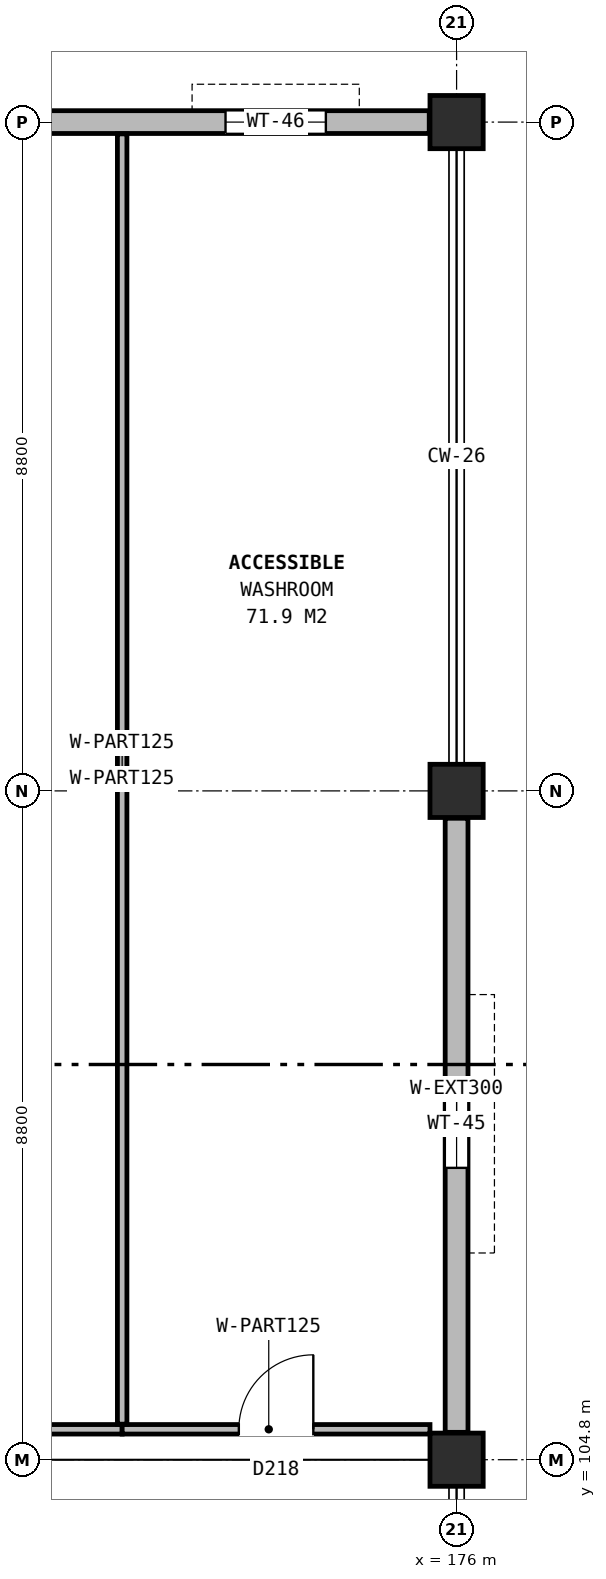
"""IFC4 building model, lengths in metres.
Left out: names, types, materials, properties, quantities, classifications, styles, units other than length and angle.
Written with IfcOpenShell. Run it as: python <this file> out.ifc"""

import sys

from ifc_helpers import new_model, si_unit, direction, frame, frame_2d, origin, origin_2d, place, context, subcontext, project, spatial, rectangle, extrude, element, fill, save


model = new_model("IFC4")
c1 = context("Model", 3, precision=1e-05, world=origin(), true_north=direction((0.0, 1.0)))
c2 = subcontext(c1, "Body", "Model", "MODEL_VIEW")
j1 = project(units=[si_unit("LENGTHUNIT", "METRE"), si_unit("PLANEANGLEUNIT", "RADIAN")], contexts=[c1])
p1 = place(None, origin())
s1 = spatial("IfcSite", under=j1, at=p1, CompositionType="ELEMENT")
p2 = place(p1, origin())
s2 = spatial("IfcBuilding", under=s1, at=p2, CompositionType="ELEMENT")
p3 = place(p2, frame((0.0, 0.0, 24.8)))
s3 = spatial("IfcBuildingStorey", under=s2, at=p3, CompositionType="ELEMENT", Elevation=24.8)
for number, where, z_axis, x_axis in (
    (1, (176.0, 104.8, 0.0), (0.0, 0.0, 1.0), (1.0, 0.0, 0.0)),
    (2, (176.0, 113.6, 0.0), (0.0, 0.0, 1.0), (1.0, 0.0, 0.0)),
    (3, (176.0, 122.4, 0.0), (0.0, 0.0, 1.0), (1.0, 0.0, 0.0)),
):
    element("IfcColumn", number, at=place(p3, frame(where, z_axis=z_axis, x_axis=x_axis)), inside=s3, PredefinedType="COLUMN", context=c2, shape_type="SweptSolid", body=[
        extrude(rectangle(XDim=0.7, YDim=0.7, at=origin_2d()), origin(), (0.0, 0.0, 1.0), 4.0),
    ])
p4 = place(p3, frame((176.0, 105.16, 0.0), z_axis=(0.0, 0.0, 1.0), x_axis=(0.0, 1.0, 0.0)))
e4 = element("IfcWall", 4, at=p4, inside=s3, PredefinedType="SOLIDWALL", context=c2, shape_type="SweptSolid", body=[
    extrude(rectangle(XDim=8.08, YDim=0.3, at=frame_2d((4.04, 0.0))), origin(), (0.0, 0.0, 1.0), 3.15),
])
p5 = place(p4, frame((3.48, 0.0, 0.9)))
e5 = element("IfcOpeningElement", 5, at=p5, cuts=e4, PredefinedType="OPENING", context=c2, shape_type="SweptSolid", body=[
    extrude(rectangle(XDim=1.16, YDim=1.74, at=frame_2d((0.58, 0.87))), frame((0.0, 0.16, 0.0), z_axis=(0.0, -1.0, 0.0), x_axis=(1.0, 0.0, 0.0)), (0.0, 0.0, 1.0), 0.32),
])
p6 = place(p3, frame((175.64, 122.4, 0.0), z_axis=(0.0, 0.0, 1.0), x_axis=(-1.0, 0.0, 0.0)))
e6 = element("IfcWall", 6, at=p6, inside=s3, PredefinedType="SOLIDWALL", context=c2, shape_type="SweptSolid", body=[
    extrude(rectangle(XDim=7.68, YDim=0.3, at=frame_2d((3.84, 0.0))), origin(), (0.0, 0.0, 1.0), 3.15),
])
p7 = place(p6, frame((1.36, 0.0, 0.9)))
e7 = element("IfcOpeningElement", 7, at=p7, cuts=e6, PredefinedType="OPENING", context=c2, shape_type="SweptSolid", body=[
    extrude(rectangle(XDim=1.32, YDim=1.78, at=frame_2d((0.66, 0.89))), frame((0.0, 0.16, 0.0), z_axis=(0.0, -1.0, 0.0), x_axis=(1.0, 0.0, 0.0)), (0.0, 0.0, 1.0), 0.32),
])
p8 = place(p3, frame((167.355, 105.2, 0.0), z_axis=(0.0, 0.0, 1.0), x_axis=(1.0, 0.0, 0.0)))
e8 = element("IfcWall", 8, at=p8, inside=s3, PredefinedType="PARTITIONING", context=c2, shape_type="SweptSolid", body=[
    extrude(rectangle(XDim=4.245, YDim=0.125, at=frame_2d((2.123, 0.0))), origin(), (0.0, 0.0, 1.0), 3.145),
])
p9 = place(p8, frame((1.633, 0.0, 0.0)))
e9 = element("IfcOpeningElement", 9, at=p9, cuts=e8, PredefinedType="OPENING", context=c2, shape_type="SweptSolid", body=[
    extrude(rectangle(XDim=0.98, YDim=2.1, at=frame_2d((0.49, 1.05))), frame((0.0, 0.073, 0.0), z_axis=(0.0, -1.0, 0.0), x_axis=(1.0, 0.0, 0.0)), (0.0, 0.0, 1.0), 0.145),
])
p10 = place(p3, frame((171.6, 105.2, 0.0), z_axis=(0.0, 0.0, 1.0), x_axis=(1.0, 0.0, 0.0)))
e10 = element("IfcWall", 10, at=p10, inside=s3, PredefinedType="PARTITIONING", context=c2, shape_type="SweptSolid", body=[
    extrude(rectangle(XDim=4.05, YDim=0.125, at=frame_2d((2.025, 0.0))), origin(), (0.0, 0.0, 1.0), 3.145),
])
p11 = place(p10, frame((1.535, 0.0, 0.0)))
e11 = element("IfcOpeningElement", 11, at=p11, cuts=e10, PredefinedType="OPENING", context=c2, shape_type="SweptSolid", body=[
    extrude(rectangle(XDim=0.98, YDim=2.1, at=frame_2d((0.49, 1.05))), frame((0.0, 0.073, 0.0), z_axis=(0.0, -1.0, 0.0), x_axis=(1.0, 0.0, 0.0)), (0.0, 0.0, 1.0), 0.145),
])
p12 = place(p3, frame((171.6, 105.268, 0.0), z_axis=(0.0, 0.0, 1.0), x_axis=(0.0, 1.0, 0.0)))
e12 = element("IfcWall", 12, at=p12, inside=s3, PredefinedType="PARTITIONING", context=c2, shape_type="SweptSolid", body=[
    extrude(rectangle(XDim=16.978, YDim=0.125, at=frame_2d((8.489, 0.0))), origin(), (0.0, 0.0, 1.0), 3.665),
])
p13 = place(p5, origin())
e13 = element("IfcWindow", 13, at=p13, inside=s3, PartitioningType="SINGLE_PANEL", PredefinedType="WINDOW", context=c2, shape_type="SweptSolid", body=[
    extrude(rectangle(XDim=1.16, YDim=1.74, at=frame_2d((0.58, 0.87))), frame((0.0, 0.03, 0.0), z_axis=(0.0, -1.0, 0.0), x_axis=(1.0, 0.0, 0.0)), (0.0, 0.0, 1.0), 0.06),
])
fill(e5, e13)
p14 = place(p7, origin())
e14 = element("IfcWindow", 14, at=p14, inside=s3, PartitioningType="SINGLE_PANEL", PredefinedType="WINDOW", context=c2, shape_type="SweptSolid", body=[
    extrude(rectangle(XDim=1.32, YDim=1.78, at=frame_2d((0.66, 0.89))), frame((0.0, 0.03, 0.0), z_axis=(0.0, -1.0, 0.0), x_axis=(1.0, 0.0, 0.0)), (0.0, 0.0, 1.0), 0.06),
])
fill(e7, e14)
p15 = place(p11, origin())
e15 = element("IfcDoor", 15, at=p15, inside=s3, OperationType="SINGLE_SWING_RIGHT", PredefinedType="DOOR", context=c2, shape_type="SweptSolid", body=[
    extrude(rectangle(XDim=0.98, YDim=2.1, at=frame_2d((0.49, 1.05))), frame((0.0, 0.025, 0.0), z_axis=(0.0, -1.0, 0.0), x_axis=(1.0, 0.0, 0.0)), (0.0, 0.0, 1.0), 0.05),
])
fill(e11, e15)
save(model, sys.argv[1])
